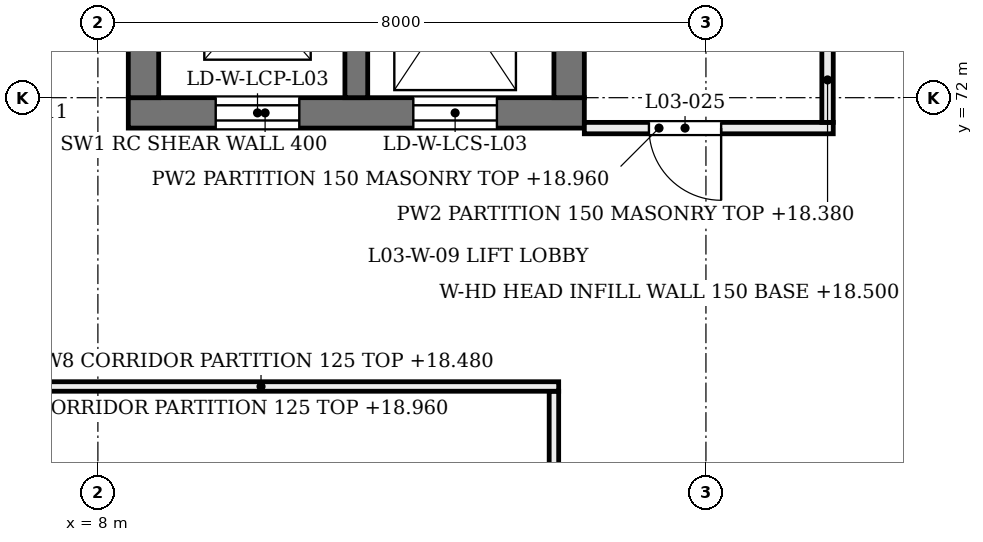
"""IFC4 building model, lengths in metres.
Left out: names, types, materials, properties, quantities, classifications, styles, units other than length and angle.
Written with IfcOpenShell. Run it as: python <this file> out.ifc"""

import sys

from ifc_helpers import new_model, si_unit, direction, frame, frame_2d, origin, place, context, subcontext, project, spatial, rectangle, extrude, element, fill, save


model = new_model("IFC4")
c1 = context("Model", 3, precision=1e-05, world=origin(), true_north=direction((0.0, 1.0)))
c2 = subcontext(c1, "Body", "Model", "MODEL_VIEW")
j1 = project(units=[si_unit("LENGTHUNIT", "METRE"), si_unit("PLANEANGLEUNIT", "RADIAN")], contexts=[c1])
p1 = place(None, origin())
s1 = spatial("IfcSite", under=j1, at=p1, CompositionType="ELEMENT")
p2 = place(p1, origin())
s2 = spatial("IfcBuilding", under=s1, at=p2, CompositionType="ELEMENT")
p3 = place(p2, frame((0.0, 0.0, 14.4)))
s3 = spatial("IfcBuildingStorey", under=s2, at=p3, CompositionType="ELEMENT", Elevation=14.4)
p4 = place(p3, frame((8.4, 71.8, 0.0), z_axis=(0.0, 0.0, 1.0), x_axis=(1.0, 0.0, 0.0)))
e1 = element("IfcWall", 1, at=p4, inside=s3, PredefinedType="SHEAR", context=c2, shape_type="SweptSolid", body=[
    extrude(rectangle(XDim=6.0, YDim=0.4, at=frame_2d((3.0, 0.0))), origin(), (0.0, 0.0, 1.0), 4.58),
])
p5 = place(p4, frame((1.15, 0.0, 0.0)))
e2 = element("IfcOpeningElement", 2, at=p5, cuts=e1, PredefinedType="OPENING", context=c2, shape_type="SweptSolid", body=[
    extrude(rectangle(XDim=1.1, YDim=2.1, at=frame_2d((0.55, 1.05))), frame((0.0, 0.21, 0.0), z_axis=(0.0, -1.0, 0.0), x_axis=(1.0, 0.0, 0.0)), (0.0, 0.0, 1.0), 0.42),
])
p6 = place(p4, frame((3.75, 0.0, 0.0)))
e3 = element("IfcOpeningElement", 3, at=p6, cuts=e1, PredefinedType="OPENING", context=c2, shape_type="SweptSolid", body=[
    extrude(rectangle(XDim=1.1, YDim=2.1, at=frame_2d((0.55, 1.05))), frame((0.0, 0.21, 0.0), z_axis=(0.0, -1.0, 0.0), x_axis=(1.0, 0.0, 0.0)), (0.0, 0.0, 1.0), 0.42),
])
for number, where, z_axis, x_axis in (
    (4, (8.6, 72.0, 0.0), (0.0, 0.0, 1.0), (0.0, 1.0, 0.0)),
    (5, (14.2, 72.0, 0.0), (0.0, 0.0, 1.0), (0.0, 1.0, 0.0)),
):
    element("IfcWall", number, at=place(p3, frame(where, z_axis=z_axis, x_axis=x_axis)), inside=s3, PredefinedType="SHEAR", context=c2, shape_type="SweptSolid", body=[
        extrude(rectangle(XDim=2.6, YDim=0.4, at=frame_2d((1.3, 0.0))), origin(), (0.0, 0.0, 1.0), 4.58),
    ])
p7 = place(p3, frame((11.4, 72.0, 0.0), z_axis=(0.0, 0.0, 1.0), x_axis=(0.0, 1.0, 0.0)))
e6 = element("IfcWall", 6, at=p7, inside=s3, PredefinedType="SHEAR", context=c2, shape_type="SweptSolid", body=[
    extrude(rectangle(XDim=2.6, YDim=0.3, at=frame_2d((1.3, 0.0))), origin(), (0.0, 0.0, 1.0), 4.58),
])
p8 = place(p3, frame((14.0, 64.1, 0.0), z_axis=(0.0, 0.0, 1.0), x_axis=(0.0, 1.0, 0.0)))
e7 = element("IfcWall", 7, at=p8, inside=s3, PredefinedType="PARTITIONING", context=c2, shape_type="SweptSolid", body=[
    extrude(rectangle(XDim=4.037, YDim=0.125, at=frame_2d((2.019, 0.0))), origin(), (0.0, 0.0, 1.0), 3.88),
])
p9 = place(p8, frame((1.75, 0.0, 0.0)))
e8 = element("IfcOpeningElement", 8, at=p9, cuts=e7, PredefinedType="OPENING", context=c2, shape_type="SweptSolid", body=[
    extrude(rectangle(XDim=1.15, YDim=2.1, at=frame_2d((0.575, 1.05))), frame((0.0, 0.073, 0.0), z_axis=(0.0, -1.0, 0.0), x_axis=(1.0, 0.0, 0.0)), (0.0, 0.0, 1.0), 0.145),
])
p10 = place(p3, frame((6.23, 68.2, 0.0), z_axis=(0.0, 0.0, 1.0), x_axis=(1.0, 0.0, 0.0)))
e9 = element("IfcWall", 9, at=p10, inside=s3, PredefinedType="PARTITIONING", context=c2, shape_type="SweptSolid", body=[
    extrude(rectangle(XDim=7.833, YDim=0.125, at=frame_2d((3.916, 0.0))), origin(), (0.0, 0.0, 1.0), 4.08),
])
p11 = place(p3, frame((14.4, 71.6, 0.0), z_axis=(0.0, 0.0, 1.0), x_axis=(1.0, 0.0, 0.0)))
e10 = element("IfcWall", 10, at=p11, inside=s3, PredefinedType="PARTITIONING", context=c2, shape_type="SweptSolid", body=[
    extrude(rectangle(XDim=3.275, YDim=0.15, at=frame_2d((1.638, 0.0))), origin(), (0.0, 0.0, 1.0), 4.56),
])
p12 = place(p11, frame((0.85, 0.0, 0.0)))
e11 = element("IfcOpeningElement", 11, at=p12, cuts=e10, PredefinedType="OPENING", context=c2, shape_type="SweptSolid", body=[
    extrude(rectangle(XDim=0.95, YDim=2.1, at=frame_2d((0.475, 1.05))), frame((0.0, 0.085, 0.0), z_axis=(0.0, -1.0, 0.0), x_axis=(1.0, 0.0, 0.0)), (0.0, 0.0, 1.0), 0.17),
])
p13 = place(p3, frame((17.6, 71.675, 0.0), z_axis=(0.0, 0.0, 1.0), x_axis=(0.0, 1.0, 0.0)))
e12 = element("IfcWall", 12, at=p13, inside=s3, PredefinedType="PARTITIONING", context=c2, shape_type="SweptSolid", body=[
    extrude(rectangle(XDim=3.725, YDim=0.15, at=frame_2d((1.862, 0.0))), origin(), (0.0, 0.0, 1.0), 3.98),
])
p14 = place(p5, frame((1.1, 0.0, 0.0), z_axis=(0.0, 0.0, 1.0), x_axis=(-1.0, 0.0, 0.0)))
e13 = element("IfcDoor", 13, at=p14, inside=s3, OperationType="DOUBLE_DOOR_SLIDING", PredefinedType="DOOR", context=c2, shape_type="SweptSolid", body=[
    extrude(rectangle(XDim=1.1, YDim=2.1, at=frame_2d((0.55, 1.05))), frame((0.0, 0.025, 0.0), z_axis=(0.0, -1.0, 0.0), x_axis=(1.0, 0.0, 0.0)), (0.0, 0.0, 1.0), 0.05),
])
fill(e2, e13)
p15 = place(p6, frame((1.1, 0.0, 0.0), z_axis=(0.0, 0.0, 1.0), x_axis=(-1.0, 0.0, 0.0)))
e14 = element("IfcDoor", 14, at=p15, inside=s3, OperationType="DOUBLE_DOOR_SLIDING", PredefinedType="DOOR", context=c2, shape_type="SweptSolid", body=[
    extrude(rectangle(XDim=1.1, YDim=2.1, at=frame_2d((0.55, 1.05))), frame((0.0, 0.025, 0.0), z_axis=(0.0, -1.0, 0.0), x_axis=(1.0, 0.0, 0.0)), (0.0, 0.0, 1.0), 0.05),
])
fill(e3, e14)
p16 = place(p12, origin())
e15 = element("IfcDoor", 15, at=p16, inside=s3, OperationType="SINGLE_SWING_RIGHT", PredefinedType="DOOR", context=c2, shape_type="SweptSolid", body=[
    extrude(rectangle(XDim=0.95, YDim=2.1, at=frame_2d((0.475, 1.05))), frame((0.0, 0.025, 0.0), z_axis=(0.0, -1.0, 0.0), x_axis=(1.0, 0.0, 0.0)), (0.0, 0.0, 1.0), 0.05),
])
fill(e11, e15)
save(model, sys.argv[1])
